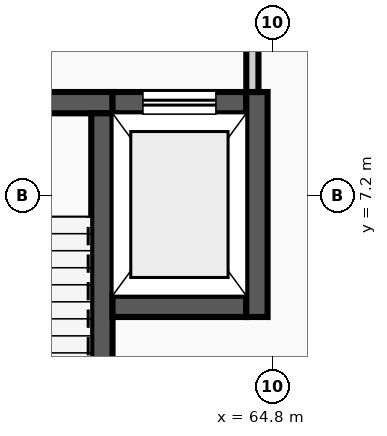
"""IFC4 building model, lengths in metres.
Left out: names, types, materials, properties, quantities, classifications, styles, units other than length and angle.
Written with IfcOpenShell. Run it as: python <this file> out.ifc"""

import sys

from ifc_helpers import new_model, si_unit, direction, frame, frame_2d, origin, place, context, subcontext, project, spatial, rectangle, extrude, element, fill, save


model = new_model("IFC4")
c1 = context("Model", 3, precision=1e-05, world=origin(), true_north=direction((0.0, 1.0)))
c2 = subcontext(c1, "Body", "Model", "MODEL_VIEW")
j1 = project(units=[si_unit("LENGTHUNIT", "METRE"), si_unit("PLANEANGLEUNIT", "RADIAN")], contexts=[c1])
p1 = place(None, origin())
s1 = spatial("IfcSite", under=j1, at=p1, CompositionType="ELEMENT")
p2 = place(p1, origin())
s2 = spatial("IfcBuilding", under=s1, at=p2, CompositionType="ELEMENT")
p3 = place(p2, frame((0.0, 0.0, -4.8)))
s3 = spatial("IfcBuildingStorey", under=s2, at=p3, CompositionType="ELEMENT", Elevation=-4.8)
p4 = place(p3, frame((58.32, 8.725, 0.0), z_axis=(0.0, 0.0, 1.0), x_axis=(1.0, 0.0, 0.0)))
e1 = element("IfcWall", 1, at=p4, inside=s3, PredefinedType="SHEAR", context=c2, shape_type="SweptSolid", body=[
    extrude(rectangle(XDim=3.85, YDim=0.35, at=frame_2d((1.925, 0.0))), origin(), (0.0, 0.0, 1.0), 4.545),
])
p5 = place(p4, frame((1.375, 0.0, 0.0)))
e2 = element("IfcOpeningElement", 2, at=p5, cuts=e1, PredefinedType="OPENING", context=c2, shape_type="SweptSolid", body=[
    extrude(rectangle(XDim=1.1, YDim=2.15, at=frame_2d((0.55, 1.075))), frame((0.0, 0.185, 0.0), z_axis=(0.0, -1.0, 0.0), x_axis=(1.0, 0.0, 0.0)), (0.0, 0.0, 1.0), 0.37),
])
p6 = place(p3, frame((61.995, 0.75, 0.0), z_axis=(0.0, 0.0, 1.0), x_axis=(0.0, 1.0, 0.0)))
e3 = element("IfcWall", 3, at=p6, inside=s3, PredefinedType="SHEAR", context=c2, shape_type="SweptSolid", body=[
    extrude(rectangle(XDim=7.8, YDim=0.35, at=frame_2d((3.9, 0.0))), origin(), (0.0, 0.0, 1.0), 4.545),
])
p7 = place(p3, frame((62.17, 5.375, 0.0), z_axis=(0.0, 0.0, 1.0), x_axis=(1.0, 0.0, 0.0)))
e4 = element("IfcWall", 4, at=p7, inside=s3, PredefinedType="SHEAR", context=c2, shape_type="SweptSolid", body=[
    extrude(rectangle(XDim=2.2, YDim=0.35, at=frame_2d((1.1, 0.0))), origin(), (0.0, 0.0, 1.0), 4.545),
])
p8 = place(p3, frame((62.17, 8.725, 0.0), z_axis=(0.0, 0.0, 1.0), x_axis=(1.0, 0.0, 0.0)))
e5 = element("IfcWall", 5, at=p8, inside=s3, PredefinedType="SHEAR", context=c2, shape_type="SweptSolid", body=[
    extrude(rectangle(XDim=2.2, YDim=0.35, at=frame_2d((1.1, 0.0))), origin(), (0.0, 0.0, 1.0), 4.545),
])
p9 = place(p8, frame((0.5, 0.0, 0.0)))
e6 = element("IfcOpeningElement", 6, at=p9, cuts=e5, PredefinedType="OPENING", context=c2, shape_type="SweptSolid", body=[
    extrude(rectangle(XDim=1.2, YDim=2.2, at=frame_2d((0.6, 1.1))), frame((0.0, 0.185, 0.0), z_axis=(0.0, -1.0, 0.0), x_axis=(1.0, 0.0, 0.0)), (0.0, 0.0, 1.0), 0.37),
])
p10 = place(p3, frame((64.545, 5.2, 0.0), z_axis=(0.0, 0.0, 1.0), x_axis=(0.0, 1.0, 0.0)))
e7 = element("IfcWall", 7, at=p10, inside=s3, PredefinedType="SHEAR", context=c2, shape_type="SweptSolid", body=[
    extrude(rectangle(XDim=3.7, YDim=0.35, at=frame_2d((1.85, 0.0))), origin(), (0.0, 0.0, 1.0), 4.545),
])
p11 = place(p3, frame((64.47, 8.9, 0.0), z_axis=(0.0, 0.0, 1.0), x_axis=(0.0, 1.0, 0.0)))
e8 = element("IfcWall", 8, at=p11, inside=s3, PredefinedType="PARTITIONING", context=c2, shape_type="SweptSolid", body=[
    extrude(rectangle(XDim=2.45, YDim=0.2, at=frame_2d((1.225, 0.0))), origin(), (0.0, 0.0, 1.0), 4.545),
])
p12 = place(p9, origin())
e9 = element("IfcDoor", 9, at=p12, inside=s3, OperationType="SLIDING_TO_RIGHT", PredefinedType="DOOR", context=c2, shape_type="SweptSolid", body=[
    extrude(rectangle(XDim=1.2, YDim=2.2, at=frame_2d((0.6, 1.1))), frame((0.0, 0.025, 0.0), z_axis=(0.0, -1.0, 0.0), x_axis=(1.0, 0.0, 0.0)), (0.0, 0.0, 1.0), 0.05),
])
fill(e6, e9)
save(model, sys.argv[1])
